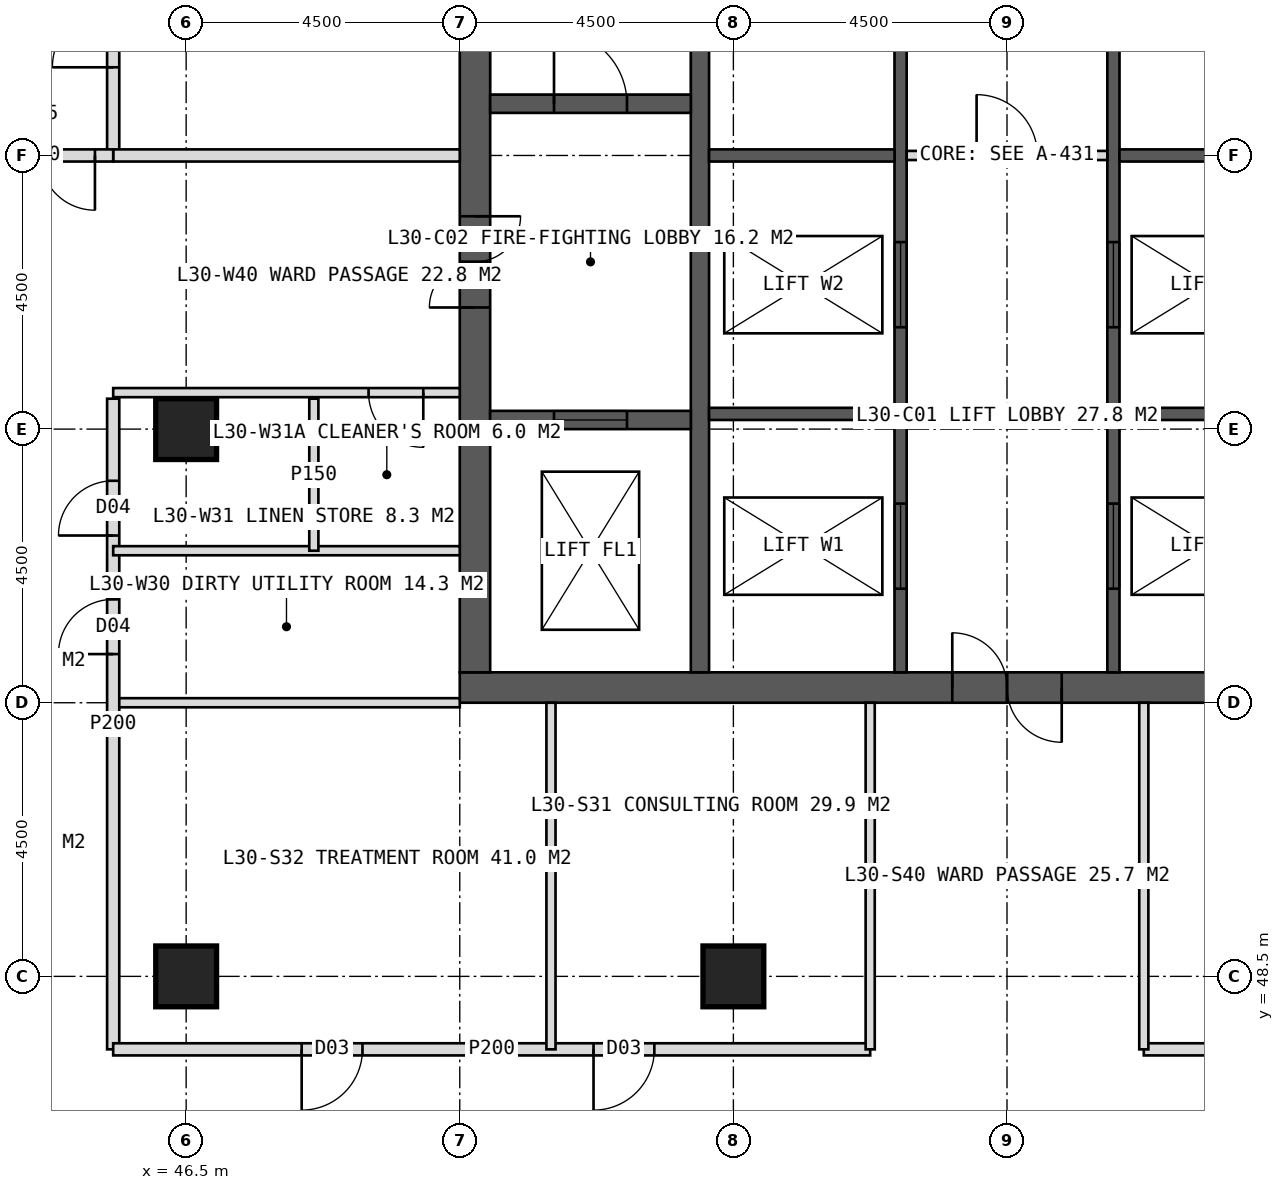
"""IFC4 building model, lengths in metres.
Left out: names, types, materials, properties, quantities, classifications, styles, units other than length and angle.
Written with IfcOpenShell. Run it as: python <this file> out.ifc"""

import sys

from ifc_helpers import new_model, si_unit, direction, frame, frame_2d, origin, origin_2d, place, context, subcontext, project, spatial, rectangle, hollow_rectangle, extrude, element, fill, save


model = new_model("IFC4")
c1 = context("Model", 3, precision=1e-05, world=origin(), true_north=direction((0.0, 1.0)))
c2 = subcontext(c1, "Body", "Model", "MODEL_VIEW")
j1 = project(units=[si_unit("LENGTHUNIT", "METRE"), si_unit("PLANEANGLEUNIT", "RADIAN")], contexts=[c1])
p1 = place(None, origin())
s1 = spatial("IfcSite", under=j1, at=p1, CompositionType="ELEMENT")
p2 = place(p1, origin())
s2 = spatial("IfcBuilding", under=s1, at=p2, CompositionType="ELEMENT")
p3 = place(p2, frame((0.0, 0.0, 128.0)))
s3 = spatial("IfcBuildingStorey", under=s2, at=p3, CompositionType="ELEMENT", Elevation=128.0)
p4 = place(p3, frame((51.0, 53.25, 0.0), z_axis=(0.0, 0.0, 1.0), x_axis=(1.0, 0.0, 0.0)))
e1 = element("IfcWall", 1, at=p4, inside=s3, PredefinedType="SHEAR", context=c2, shape_type="SweptSolid", body=[
    extrude(rectangle(XDim=18.0, YDim=0.5, at=frame_2d((9.0, 0.0))), origin(), (0.0, 0.0, 1.0), 4.0),
])
p5 = place(p4, frame((8.1, 0.0, 0.0)))
e2 = element("IfcOpeningElement", 2, at=p5, cuts=e1, PredefinedType="OPENING", context=c2, shape_type="SweptSolid", body=[
    extrude(rectangle(XDim=1.8, YDim=2.2, at=frame_2d((0.9, 1.1))), frame((0.0, 0.26, 0.0), z_axis=(0.0, -1.0, 0.0), x_axis=(1.0, 0.0, 0.0)), (0.0, 0.0, 1.0), 0.52),
])
p6 = place(p3, frame((51.25, 53.5, 0.0), z_axis=(0.0, 0.0, 1.0), x_axis=(0.0, 1.0, 0.0)))
e3 = element("IfcWall", 3, at=p6, inside=s3, PredefinedType="SHEAR", context=c2, shape_type="SweptSolid", body=[
    extrude(rectangle(XDim=17.0, YDim=0.5, at=frame_2d((8.5, 0.0))), origin(), (0.0, 0.0, 1.0), 4.0),
])
p7 = place(p6, frame((6.0, 0.0, 0.0)))
e4 = element("IfcOpeningElement", 4, at=p7, cuts=e3, PredefinedType="OPENING", context=c2, shape_type="SweptSolid", body=[
    extrude(rectangle(XDim=1.5, YDim=2.2, at=frame_2d((0.75, 1.1))), frame((0.0, 0.26, 0.0), z_axis=(0.0, -1.0, 0.0), x_axis=(1.0, 0.0, 0.0)), (0.0, 0.0, 1.0), 0.52),
])
p8 = place(p3, frame((54.95, 53.5, 0.0), z_axis=(0.0, 0.0, 1.0), x_axis=(0.0, 1.0, 0.0)))
e5 = element("IfcWall", 5, at=p8, inside=s3, PredefinedType="SHEAR", context=c2, shape_type="SweptSolid", body=[
    extrude(rectangle(XDim=17.0, YDim=0.3, at=frame_2d((8.5, 0.0))), origin(), (0.0, 0.0, 1.0), 4.0),
])
p9 = place(p3, frame((58.25, 53.5, 0.0), z_axis=(0.0, 0.0, 1.0), x_axis=(0.0, 1.0, 0.0)))
e6 = element("IfcWall", 6, at=p9, inside=s3, PredefinedType="SHEAR", context=c2, shape_type="SweptSolid", body=[
    extrude(rectangle(XDim=17.0, YDim=0.2, at=frame_2d((8.5, 0.0))), origin(), (0.0, 0.0, 1.0), 4.0),
])
p10 = place(p9, frame((1.375, 0.0, 0.0)))
e7 = element("IfcOpeningElement", 7, at=p10, cuts=e6, PredefinedType="OPENING", context=c2, shape_type="SweptSolid", body=[
    extrude(rectangle(XDim=1.4, YDim=2.2, at=frame_2d((0.7, 1.1))), frame((0.0, 0.11, 0.0), z_axis=(0.0, -1.0, 0.0), x_axis=(1.0, 0.0, 0.0)), (0.0, 0.0, 1.0), 0.22),
])
p11 = place(p9, frame((5.675, 0.0, 0.0)))
e8 = element("IfcOpeningElement", 8, at=p11, cuts=e6, PredefinedType="OPENING", context=c2, shape_type="SweptSolid", body=[
    extrude(rectangle(XDim=1.4, YDim=2.2, at=frame_2d((0.7, 1.1))), frame((0.0, 0.11, 0.0), z_axis=(0.0, -1.0, 0.0), x_axis=(1.0, 0.0, 0.0)), (0.0, 0.0, 1.0), 0.22),
])
p12 = place(p3, frame((61.75, 53.5, 0.0), z_axis=(0.0, 0.0, 1.0), x_axis=(0.0, 1.0, 0.0)))
e9 = element("IfcWall", 9, at=p12, inside=s3, PredefinedType="SHEAR", context=c2, shape_type="SweptSolid", body=[
    extrude(rectangle(XDim=17.0, YDim=0.2, at=frame_2d((8.5, 0.0))), origin(), (0.0, 0.0, 1.0), 4.0),
])
p13 = place(p12, frame((1.375, 0.0, 0.0)))
e10 = element("IfcOpeningElement", 10, at=p13, cuts=e9, PredefinedType="OPENING", context=c2, shape_type="SweptSolid", body=[
    extrude(rectangle(XDim=1.4, YDim=2.2, at=frame_2d((0.7, 1.1))), frame((0.0, 0.11, 0.0), z_axis=(0.0, -1.0, 0.0), x_axis=(1.0, 0.0, 0.0)), (0.0, 0.0, 1.0), 0.22),
])
p14 = place(p12, frame((5.675, 0.0, 0.0)))
e11 = element("IfcOpeningElement", 11, at=p14, cuts=e9, PredefinedType="OPENING", context=c2, shape_type="SweptSolid", body=[
    extrude(rectangle(XDim=1.4, YDim=2.2, at=frame_2d((0.7, 1.1))), frame((0.0, 0.11, 0.0), z_axis=(0.0, -1.0, 0.0), x_axis=(1.0, 0.0, 0.0)), (0.0, 0.0, 1.0), 0.22),
])
for number, where, z_axis, x_axis in (
    (12, (55.1, 57.75, 0.0), (0.0, 0.0, 1.0), (1.0, 0.0, 0.0)),
    (13, (61.85, 57.75, 0.0), (0.0, 0.0, 1.0), (1.0, 0.0, 0.0)),
    (14, (55.1, 62.0, 0.0), (0.0, 0.0, 1.0), (1.0, 0.0, 0.0)),
    (15, (61.85, 62.0, 0.0), (0.0, 0.0, 1.0), (1.0, 0.0, 0.0)),
):
    element("IfcWall", number, at=place(p3, frame(where, z_axis=z_axis, x_axis=x_axis)), inside=s3, PredefinedType="SHEAR", context=c2, shape_type="SweptSolid", body=[
        extrude(rectangle(XDim=3.05, YDim=0.2, at=frame_2d((1.525, 0.0))), origin(), (0.0, 0.0, 1.0), 4.0),
    ])
p15 = place(p3, frame((51.5, 62.85, 0.0), z_axis=(0.0, 0.0, 1.0), x_axis=(1.0, 0.0, 0.0)))
e16 = element("IfcWall", 16, at=p15, inside=s3, PredefinedType="SHEAR", context=c2, shape_type="SweptSolid", body=[
    extrude(rectangle(XDim=3.3, YDim=0.3, at=frame_2d((1.65, 0.0))), origin(), (0.0, 0.0, 1.0), 4.0),
])
p16 = place(p15, frame((1.05, 0.0, 0.0)))
e17 = element("IfcOpeningElement", 17, at=p16, cuts=e16, PredefinedType="OPENING", context=c2, shape_type="SweptSolid", body=[
    extrude(rectangle(XDim=1.2, YDim=2.1, at=frame_2d((0.6, 1.05))), frame((0.0, 0.16, 0.0), z_axis=(0.0, -1.0, 0.0), x_axis=(1.0, 0.0, 0.0)), (0.0, 0.0, 1.0), 0.32),
])
p17 = place(p3, frame((51.5, 57.65, 0.0), z_axis=(0.0, 0.0, 1.0), x_axis=(1.0, 0.0, 0.0)))
e18 = element("IfcWall", 18, at=p17, inside=s3, PredefinedType="SHEAR", context=c2, shape_type="SweptSolid", body=[
    extrude(rectangle(XDim=3.3, YDim=0.3, at=frame_2d((1.65, 0.0))), origin(), (0.0, 0.0, 1.0), 4.0),
])
p18 = place(p17, frame((1.05, 0.0, 0.0)))
e19 = element("IfcOpeningElement", 19, at=p18, cuts=e18, PredefinedType="OPENING", context=c2, shape_type="SweptSolid", body=[
    extrude(rectangle(XDim=1.2, YDim=2.2, at=frame_2d((0.6, 1.1))), frame((0.0, 0.16, 0.0), z_axis=(0.0, -1.0, 0.0), x_axis=(1.0, 0.0, 0.0)), (0.0, 0.0, 1.0), 0.32),
])
for number, where, z_axis, x_axis in (
    (20, (46.5, 48.5, 0.0), (0.0, 0.0, 1.0), (1.0, 0.0, 0.0)),
    (21, (55.5, 48.5, 0.0), (0.0, 0.0, 1.0), (1.0, 0.0, 0.0)),
    (22, (46.5, 57.5, 0.0), (0.0, 0.0, 1.0), (1.0, 0.0, 0.0)),
):
    element("IfcColumn", number, at=place(p3, frame(where, z_axis=z_axis, x_axis=x_axis)), inside=s3, PredefinedType="COLUMN", context=c2, shape_type="SweptSolid", body=[
        extrude(hollow_rectangle(XDim=1.0, YDim=1.0, WallThickness=0.1, at=origin_2d()), origin(), (0.0, 0.0, 1.0), 4.0),
    ])
p19 = place(p3, frame((51.0, 53.0, 0.0), z_axis=(0.0, 0.0, 1.0), x_axis=(-1.0, 0.0, 0.0)))
e23 = element("IfcWall", 23, at=p19, inside=s3, PredefinedType="PARTITIONING", context=c2, shape_type="SweptSolid", body=[
    extrude(rectangle(XDim=5.7, YDim=0.15, at=frame_2d((2.85, 0.0))), origin(), (0.0, 0.0, 1.0), 3.75),
])
p20 = place(p3, frame((45.3, 47.3, 0.0), z_axis=(0.0, 0.0, 1.0), x_axis=(0.0, 1.0, 0.0)))
e24 = element("IfcWall", 24, at=p20, inside=s3, PredefinedType="PARTITIONING", context=c2, shape_type="SweptSolid", body=[
    extrude(rectangle(XDim=10.7, YDim=0.2, at=frame_2d((5.35, 0.0))), origin(), (0.0, 0.0, 1.0), 3.75),
])
p21 = place(p20, frame((6.5, 0.0, 0.0)))
e25 = element("IfcOpeningElement", 25, at=p21, cuts=e24, PredefinedType="OPENING", context=c2, shape_type="SweptSolid", body=[
    extrude(rectangle(XDim=0.9, YDim=2.1, at=frame_2d((0.45, 1.05))), frame((0.0, 0.11, 0.0), z_axis=(0.0, -1.0, 0.0), x_axis=(1.0, 0.0, 0.0)), (0.0, 0.0, 1.0), 0.22),
])
p22 = place(p20, frame((8.45, 0.0, 0.0)))
e26 = element("IfcOpeningElement", 26, at=p22, cuts=e24, PredefinedType="OPENING", context=c2, shape_type="SweptSolid", body=[
    extrude(rectangle(XDim=0.9, YDim=2.1, at=frame_2d((0.45, 1.05))), frame((0.0, 0.11, 0.0), z_axis=(0.0, -1.0, 0.0), x_axis=(1.0, 0.0, 0.0)), (0.0, 0.0, 1.0), 0.22),
])
p23 = place(p3, frame((45.3, 62.0, 0.0), z_axis=(0.0, 0.0, 1.0), x_axis=(0.0, 1.0, 0.0)))
e27 = element("IfcWall", 27, at=p23, inside=s3, PredefinedType="PARTITIONING", context=c2, shape_type="SweptSolid", body=[
    extrude(rectangle(XDim=14.7, YDim=0.2, at=frame_2d((7.35, 0.0))), origin(), (0.0, 0.0, 1.0), 3.75),
])
p24 = place(p23, frame((1.45, 0.0, 0.0)))
e28 = element("IfcOpeningElement", 28, at=p24, cuts=e27, PredefinedType="OPENING", context=c2, shape_type="SweptSolid", body=[
    extrude(rectangle(XDim=1.0, YDim=2.1, at=frame_2d((0.5, 1.05))), frame((0.0, 0.11, 0.0), z_axis=(0.0, -1.0, 0.0), x_axis=(1.0, 0.0, 0.0)), (0.0, 0.0, 1.0), 0.22),
])
p25 = place(p23, frame((11.35, 0.0, 0.0)))
e29 = element("IfcOpeningElement", 29, at=p25, cuts=e27, PredefinedType="OPENING", context=c2, shape_type="SweptSolid", body=[
    extrude(rectangle(XDim=1.0, YDim=2.1, at=frame_2d((0.5, 1.05))), frame((0.0, 0.11, 0.0), z_axis=(0.0, -1.0, 0.0), x_axis=(1.0, 0.0, 0.0)), (0.0, 0.0, 1.0), 0.22),
])
p26 = place(p3, frame((51.0, 58.1, 0.0), z_axis=(0.0, 0.0, 1.0), x_axis=(-1.0, 0.0, 0.0)))
e30 = element("IfcWall", 30, at=p26, inside=s3, PredefinedType="PARTITIONING", context=c2, shape_type="SweptSolid", body=[
    extrude(rectangle(XDim=5.7, YDim=0.15, at=frame_2d((2.85, 0.0))), origin(), (0.0, 0.0, 1.0), 3.75),
])
p27 = place(p26, frame((0.6, 0.0, 0.0)))
e31 = element("IfcOpeningElement", 31, at=p27, cuts=e30, PredefinedType="OPENING", context=c2, shape_type="SweptSolid", body=[
    extrude(rectangle(XDim=0.9, YDim=2.1, at=frame_2d((0.45, 1.05))), frame((0.0, 0.085, 0.0), z_axis=(0.0, -1.0, 0.0), x_axis=(1.0, 0.0, 0.0)), (0.0, 0.0, 1.0), 0.17),
])
p28 = place(p3, frame((51.0, 62.0, 0.0), z_axis=(0.0, 0.0, 1.0), x_axis=(-1.0, 0.0, 0.0)))
e32 = element("IfcWall", 32, at=p28, inside=s3, PredefinedType="SOLIDWALL", context=c2, shape_type="SweptSolid", body=[
    extrude(rectangle(XDim=5.7, YDim=0.2, at=frame_2d((2.85, 0.0))), origin(), (0.0, 0.0, 1.0), 2.95),
])
p29 = place(p3, frame((51.0, 55.5, 0.0), z_axis=(0.0, 0.0, 1.0), x_axis=(-1.0, 0.0, 0.0)))
e33 = element("IfcWall", 33, at=p29, inside=s3, PredefinedType="PARTITIONING", context=c2, shape_type="SweptSolid", body=[
    extrude(rectangle(XDim=5.7, YDim=0.15, at=frame_2d((2.85, 0.0))), origin(), (0.0, 0.0, 1.0), 3.75),
])
p30 = place(p3, frame((48.6, 55.5, 0.0), z_axis=(0.0, 0.0, 1.0), x_axis=(0.0, 1.0, 0.0)))
e34 = element("IfcWall", 34, at=p30, inside=s3, PredefinedType="PARTITIONING", context=c2, shape_type="SweptSolid", body=[
    extrude(rectangle(XDim=2.5, YDim=0.15, at=frame_2d((1.25, 0.0))), origin(), (0.0, 0.0, 1.0), 3.75),
])
p31 = place(p3, frame((74.7, 47.3, 0.0), z_axis=(0.0, 0.0, 1.0), x_axis=(-1.0, 0.0, 0.0)))
e35 = element("IfcWall", 35, at=p31, inside=s3, PredefinedType="PARTITIONING", context=c2, shape_type="SweptSolid", body=[
    extrude(rectangle(XDim=12.45, YDim=0.2, at=frame_2d((6.225, 0.0))), origin(), (0.0, 0.0, 1.0), 3.75),
])
p32 = place(p31, frame((7.15, 0.0, 0.0)))
e36 = element("IfcOpeningElement", 36, at=p32, cuts=e35, PredefinedType="OPENING", context=c2, shape_type="SweptSolid", body=[
    extrude(rectangle(XDim=1.0, YDim=2.1, at=frame_2d((0.5, 1.05))), frame((0.0, 0.11, 0.0), z_axis=(0.0, -1.0, 0.0), x_axis=(1.0, 0.0, 0.0)), (0.0, 0.0, 1.0), 0.22),
])
p33 = place(p3, frame((57.75, 47.3, 0.0), z_axis=(0.0, 0.0, 1.0), x_axis=(-1.0, 0.0, 0.0)))
e37 = element("IfcWall", 37, at=p33, inside=s3, PredefinedType="PARTITIONING", context=c2, shape_type="SweptSolid", body=[
    extrude(rectangle(XDim=12.45, YDim=0.2, at=frame_2d((6.225, 0.0))), origin(), (0.0, 0.0, 1.0), 3.75),
])
p34 = place(p33, frame((3.55, 0.0, 0.0)))
e38 = element("IfcOpeningElement", 38, at=p34, cuts=e37, PredefinedType="OPENING", context=c2, shape_type="SweptSolid", body=[
    extrude(rectangle(XDim=1.0, YDim=2.1, at=frame_2d((0.5, 1.05))), frame((0.0, 0.11, 0.0), z_axis=(0.0, -1.0, 0.0), x_axis=(1.0, 0.0, 0.0)), (0.0, 0.0, 1.0), 0.22),
])
p35 = place(p33, frame((8.35, 0.0, 0.0)))
e39 = element("IfcOpeningElement", 39, at=p35, cuts=e37, PredefinedType="OPENING", context=c2, shape_type="SweptSolid", body=[
    extrude(rectangle(XDim=1.0, YDim=2.1, at=frame_2d((0.5, 1.05))), frame((0.0, 0.11, 0.0), z_axis=(0.0, -1.0, 0.0), x_axis=(1.0, 0.0, 0.0)), (0.0, 0.0, 1.0), 0.22),
])
for number, where, z_axis, x_axis in (
    (40, (62.25, 53.0, 0.0), (0.0, 0.0, 1.0), (0.0, -1.0, 0.0)),
    (41, (57.75, 53.0, 0.0), (0.0, 0.0, 1.0), (0.0, -1.0, 0.0)),
    (42, (52.5, 53.0, 0.0), (0.0, 0.0, 1.0), (0.0, -1.0, 0.0)),
):
    element("IfcWall", number, at=place(p3, frame(where, z_axis=z_axis, x_axis=x_axis)), inside=s3, PredefinedType="PARTITIONING", context=c2, shape_type="SweptSolid", body=[
        extrude(rectangle(XDim=5.7, YDim=0.15, at=frame_2d((2.85, 0.0))), origin(), (0.0, 0.0, 1.0), 3.75),
    ])
p36 = place(p3, frame((45.3, 62.0, 0.0), z_axis=(0.0, 0.0, 1.0), x_axis=(-1.0, 0.0, 0.0)))
e43 = element("IfcWall", 43, at=p36, inside=s3, PredefinedType="SOLIDWALL", context=c2, shape_type="SweptSolid", body=[
    extrude(rectangle(XDim=2.7, YDim=0.2, at=frame_2d((1.35, 0.0))), origin(), (0.0, 0.0, 1.0), 2.95),
])
p37 = place(p36, frame((0.3, 0.0, 0.0)))
e44 = element("IfcOpeningElement", 44, at=p37, cuts=e43, PredefinedType="OPENING", context=c2, shape_type="SweptSolid", body=[
    extrude(rectangle(XDim=1.8, YDim=2.2, at=frame_2d((0.9, 1.1))), frame((0.0, 0.11, 0.0), z_axis=(0.0, -1.0, 0.0), x_axis=(1.0, 0.0, 0.0)), (0.0, 0.0, 1.0), 0.22),
])
p38 = place(p3, frame((58.35, 62.0, 0.0), z_axis=(0.0, 0.0, 1.0), x_axis=(1.0, 0.0, 0.0)))
e45 = element("IfcWall", 45, at=p38, inside=s3, PredefinedType="PARTITIONING", context=c2, shape_type="SweptSolid", body=[
    extrude(rectangle(XDim=3.3, YDim=0.15, at=frame_2d((1.65, 0.0))), origin(), (0.0, 0.0, 1.0), 3.75),
])
p39 = place(p38, frame((1.15, 0.0, 0.0)))
e46 = element("IfcOpeningElement", 46, at=p39, cuts=e45, PredefinedType="OPENING", context=c2, shape_type="SweptSolid", body=[
    extrude(rectangle(XDim=1.0, YDim=2.1, at=frame_2d((0.5, 1.05))), frame((0.0, 0.085, 0.0), z_axis=(0.0, -1.0, 0.0), x_axis=(1.0, 0.0, 0.0)), (0.0, 0.0, 1.0), 0.17),
])
p40 = place(p21, origin())
e47 = element("IfcDoor", 47, at=p40, inside=s3, OperationType="SINGLE_SWING_LEFT", PredefinedType="DOOR", context=c2, shape_type="SweptSolid", body=[
    extrude(rectangle(XDim=0.9, YDim=2.1, at=frame_2d((0.45, 1.05))), frame((0.0, 0.025, 0.0), z_axis=(0.0, -1.0, 0.0), x_axis=(1.0, 0.0, 0.0)), (0.0, 0.0, 1.0), 0.05),
])
fill(e25, e47)
p41 = place(p27, origin())
e48 = element("IfcDoor", 48, at=p41, inside=s3, OperationType="SINGLE_SWING_LEFT", PredefinedType="DOOR", context=c2, shape_type="SweptSolid", body=[
    extrude(rectangle(XDim=0.9, YDim=2.1, at=frame_2d((0.45, 1.05))), frame((0.0, 0.025, 0.0), z_axis=(0.0, -1.0, 0.0), x_axis=(1.0, 0.0, 0.0)), (0.0, 0.0, 1.0), 0.05),
])
fill(e31, e48)
p42 = place(p22, origin())
e49 = element("IfcDoor", 49, at=p42, inside=s3, OperationType="SINGLE_SWING_LEFT", PredefinedType="DOOR", context=c2, shape_type="SweptSolid", body=[
    extrude(rectangle(XDim=0.9, YDim=2.1, at=frame_2d((0.45, 1.05))), frame((0.0, 0.025, 0.0), z_axis=(0.0, -1.0, 0.0), x_axis=(1.0, 0.0, 0.0)), (0.0, 0.0, 1.0), 0.05),
])
fill(e26, e49)
p43 = place(p24, origin())
e50 = element("IfcDoor", 50, at=p43, inside=s3, OperationType="SINGLE_SWING_LEFT", PredefinedType="DOOR", context=c2, shape_type="SweptSolid", body=[
    extrude(rectangle(XDim=1.0, YDim=2.1, at=frame_2d((0.5, 1.05))), frame((0.0, 0.025, 0.0), z_axis=(0.0, -1.0, 0.0), x_axis=(1.0, 0.0, 0.0)), (0.0, 0.0, 1.0), 0.05),
])
fill(e28, e50)
p44 = place(p34, origin())
e51 = element("IfcDoor", 51, at=p44, inside=s3, OperationType="SINGLE_SWING_RIGHT", PredefinedType="DOOR", context=c2, shape_type="SweptSolid", body=[
    extrude(rectangle(XDim=1.0, YDim=2.1, at=frame_2d((0.5, 1.05))), frame((0.0, 0.025, 0.0), z_axis=(0.0, -1.0, 0.0), x_axis=(1.0, 0.0, 0.0)), (0.0, 0.0, 1.0), 0.05),
])
fill(e38, e51)
p45 = place(p35, origin())
e52 = element("IfcDoor", 52, at=p45, inside=s3, OperationType="SINGLE_SWING_RIGHT", PredefinedType="DOOR", context=c2, shape_type="SweptSolid", body=[
    extrude(rectangle(XDim=1.0, YDim=2.1, at=frame_2d((0.5, 1.05))), frame((0.0, 0.025, 0.0), z_axis=(0.0, -1.0, 0.0), x_axis=(1.0, 0.0, 0.0)), (0.0, 0.0, 1.0), 0.05),
])
fill(e39, e52)
p46 = place(p37, origin())
e53 = element("IfcDoor", 53, at=p46, inside=s3, OperationType="DOUBLE_DOOR_DOUBLE_SWING", PredefinedType="DOOR", context=c2, shape_type="SweptSolid", body=[
    extrude(rectangle(XDim=1.8, YDim=2.2, at=frame_2d((0.9, 1.1))), frame((0.0, 0.025, 0.0), z_axis=(0.0, -1.0, 0.0), x_axis=(1.0, 0.0, 0.0)), (0.0, 0.0, 1.0), 0.05),
])
fill(e44, e53)
p47 = place(p5, origin())
e54 = element("IfcDoor", 54, at=p47, inside=s3, OperationType="DOUBLE_DOOR_SINGLE_SWING", PredefinedType="DOOR", context=c2, shape_type="SweptSolid", body=[
    extrude(rectangle(XDim=1.8, YDim=2.2, at=frame_2d((0.9, 1.1))), frame((0.0, 0.025, 0.0), z_axis=(0.0, -1.0, 0.0), x_axis=(1.0, 0.0, 0.0)), (0.0, 0.0, 1.0), 0.05),
])
fill(e2, e54)
p48 = place(p7, origin())
e55 = element("IfcDoor", 55, at=p48, inside=s3, OperationType="DOUBLE_DOOR_SINGLE_SWING", PredefinedType="DOOR", context=c2, shape_type="SweptSolid", body=[
    extrude(rectangle(XDim=1.5, YDim=2.2, at=frame_2d((0.75, 1.1))), frame((0.0, 0.025, 0.0), z_axis=(0.0, -1.0, 0.0), x_axis=(1.0, 0.0, 0.0)), (0.0, 0.0, 1.0), 0.05),
])
fill(e4, e55)
p49 = place(p16, origin())
e56 = element("IfcDoor", 56, at=p49, inside=s3, OperationType="SINGLE_SWING_LEFT", PredefinedType="DOOR", context=c2, shape_type="SweptSolid", body=[
    extrude(rectangle(XDim=1.2, YDim=2.1, at=frame_2d((0.6, 1.05))), frame((0.0, 0.025, 0.0), z_axis=(0.0, -1.0, 0.0), x_axis=(1.0, 0.0, 0.0)), (0.0, 0.0, 1.0), 0.05),
])
fill(e17, e56)
p50 = place(p18, origin())
e57 = element("IfcDoor", 57, at=p50, inside=s3, OperationType="SLIDING_TO_LEFT", PredefinedType="DOOR", context=c2, shape_type="SweptSolid", body=[
    extrude(rectangle(XDim=1.2, YDim=2.2, at=frame_2d((0.6, 1.1))), frame((0.0, 0.025, 0.0), z_axis=(0.0, -1.0, 0.0), x_axis=(1.0, 0.0, 0.0)), (0.0, 0.0, 1.0), 0.05),
])
fill(e19, e57)
p51 = place(p10, origin())
e58 = element("IfcDoor", 58, at=p51, inside=s3, OperationType="SLIDING_TO_LEFT", PredefinedType="DOOR", context=c2, shape_type="SweptSolid", body=[
    extrude(rectangle(XDim=1.4, YDim=2.2, at=frame_2d((0.7, 1.1))), frame((0.0, 0.025, 0.0), z_axis=(0.0, -1.0, 0.0), x_axis=(1.0, 0.0, 0.0)), (0.0, 0.0, 1.0), 0.05),
])
fill(e7, e58)
p52 = place(p13, origin())
e59 = element("IfcDoor", 59, at=p52, inside=s3, OperationType="SLIDING_TO_LEFT", PredefinedType="DOOR", context=c2, shape_type="SweptSolid", body=[
    extrude(rectangle(XDim=1.4, YDim=2.2, at=frame_2d((0.7, 1.1))), frame((0.0, 0.025, 0.0), z_axis=(0.0, -1.0, 0.0), x_axis=(1.0, 0.0, 0.0)), (0.0, 0.0, 1.0), 0.05),
])
fill(e10, e59)
p53 = place(p11, origin())
e60 = element("IfcDoor", 60, at=p53, inside=s3, OperationType="SLIDING_TO_LEFT", PredefinedType="DOOR", context=c2, shape_type="SweptSolid", body=[
    extrude(rectangle(XDim=1.4, YDim=2.2, at=frame_2d((0.7, 1.1))), frame((0.0, 0.025, 0.0), z_axis=(0.0, -1.0, 0.0), x_axis=(1.0, 0.0, 0.0)), (0.0, 0.0, 1.0), 0.05),
])
fill(e8, e60)
p54 = place(p14, origin())
e61 = element("IfcDoor", 61, at=p54, inside=s3, OperationType="SLIDING_TO_LEFT", PredefinedType="DOOR", context=c2, shape_type="SweptSolid", body=[
    extrude(rectangle(XDim=1.4, YDim=2.2, at=frame_2d((0.7, 1.1))), frame((0.0, 0.025, 0.0), z_axis=(0.0, -1.0, 0.0), x_axis=(1.0, 0.0, 0.0)), (0.0, 0.0, 1.0), 0.05),
])
fill(e11, e61)
p55 = place(p39, origin())
e62 = element("IfcDoor", 62, at=p55, inside=s3, OperationType="SINGLE_SWING_LEFT", PredefinedType="DOOR", context=c2, shape_type="SweptSolid", body=[
    extrude(rectangle(XDim=1.0, YDim=2.1, at=frame_2d((0.5, 1.05))), frame((0.0, 0.025, 0.0), z_axis=(0.0, -1.0, 0.0), x_axis=(1.0, 0.0, 0.0)), (0.0, 0.0, 1.0), 0.05),
])
fill(e46, e62)
save(model, sys.argv[1])
